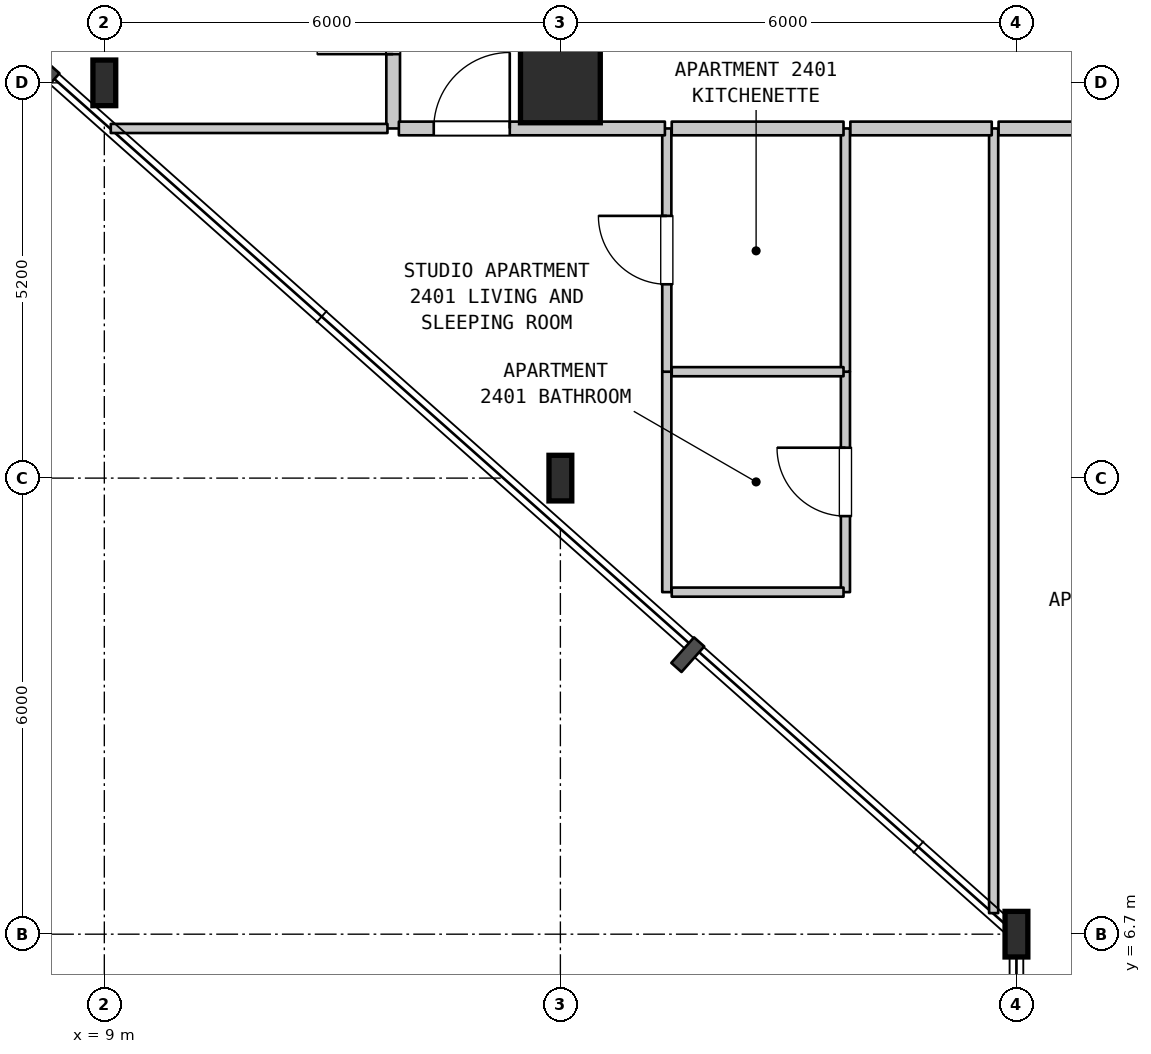
"""IFC4 building model, lengths in metres.
Left out: names, types, materials, properties, quantities, classifications, styles, units other than length and angle.
Written with IfcOpenShell. Run it as: python <this file> out.ifc"""

import sys

from ifc_helpers import new_model, si_unit, direction, frame, frame_2d, origin, origin_2d, place, context, subcontext, project, spatial, rectangle, i_section, extrude, element, fill, save


model = new_model("IFC4")
c1 = context("Model", 3, precision=1e-05, world=origin(), true_north=direction((0.0, 1.0)))
c2 = subcontext(c1, "Body", "Model", "MODEL_VIEW")
j1 = project(units=[si_unit("LENGTHUNIT", "METRE"), si_unit("PLANEANGLEUNIT", "RADIAN")], contexts=[c1])
p1 = place(None, origin())
s1 = spatial("IfcSite", under=j1, at=p1, CompositionType="ELEMENT")
p2 = place(p1, origin())
s2 = spatial("IfcBuilding", under=s1, at=p2, CompositionType="ELEMENT")
p3 = place(p2, frame((0.0, 0.0, 102.0)))
s3 = spatial("IfcBuildingStorey", under=s2, at=p3, CompositionType="ELEMENT", Elevation=102.0)
for number, where, z_axis, x_axis in (
    (1, (9.0, 17.9, 0.0), (0.0, 0.0, 1.0), (1.0, 0.0, 0.0)),
    (2, (15.0, 12.7, 0.0), (0.0, 0.0, 1.0), (1.0, 0.0, 0.0)),
):
    element("IfcColumn", number, at=place(p3, frame(where, z_axis=z_axis, x_axis=x_axis)), inside=s3, PredefinedType="COLUMN", context=c2, shape_type="SweptSolid", body=[
        extrude(i_section(OverallWidth=0.3, OverallDepth=0.6, WebThickness=0.015, FlangeThickness=0.03, FilletRadius=0.027, at=origin_2d()), origin(), (0.0, 0.0, 1.0), 3.7),
    ])
p4 = place(p3, frame((15.0, 17.9, 0.0), z_axis=(0.0, 0.0, 1.0), x_axis=(1.0, 0.0, 0.0)))
e3 = element("IfcColumn", 3, at=p4, inside=s3, PredefinedType="COLUMN", context=c2, shape_type="SweptSolid", body=[
    extrude(rectangle(XDim=1.05, YDim=1.05, at=origin_2d()), origin(), (0.0, 0.0, 1.0), 3.7),
])
p5 = place(p3, frame((21.0, 6.7, 0.0), z_axis=(0.0, 0.0, 1.0), x_axis=(1.0, 0.0, 0.0)))
e4 = element("IfcColumn", 4, at=p5, inside=s3, PredefinedType="COLUMN", context=c2, shape_type="SweptSolid", body=[
    extrude(i_section(OverallWidth=0.3, OverallDepth=0.6, WebThickness=0.015, FlangeThickness=0.03, FilletRadius=0.027, at=origin_2d()), origin(), (0.0, 0.0, 1.0), 3.7),
])
p6 = place(p3, frame((12.8, 17.3, 0.0), z_axis=(0.0, 0.0, 1.0), x_axis=(0.0, 1.0, 0.0)))
e5 = element("IfcWall", 5, at=p6, inside=s3, PredefinedType="STANDARD", context=c2, shape_type="SweptSolid", body=[
    extrude(rectangle(XDim=3.1, YDim=0.18, at=frame_2d((1.55, 0.0))), origin(), (0.0, 0.0, 1.0), 3.385),
])
p7 = place(p6, frame((0.978, 0.0, 0.0)))
e6 = element("IfcOpeningElement", 6, at=p7, cuts=e5, PredefinedType="OPENING", context=c2, shape_type="SweptSolid", body=[
    extrude(rectangle(XDim=1.0, YDim=2.15, at=frame_2d((0.5, 1.075))), frame((0.0, 0.1, 0.0), z_axis=(0.0, -1.0, 0.0), x_axis=(1.0, 0.0, 0.0)), (0.0, 0.0, 1.0), 0.2),
])
p8 = place(p3, frame((16.4, 11.2, 0.0), z_axis=(0.0, 0.0, 1.0), x_axis=(0.0, 1.0, 0.0)))
e7 = element("IfcWall", 7, at=p8, inside=s3, PredefinedType="PARTITIONING", context=c2, shape_type="SweptSolid", body=[
    extrude(rectangle(XDim=2.9, YDim=0.12, at=frame_2d((1.45, 0.0))), origin(), (0.0, 0.0, 1.0), 3.385),
])
p9 = place(p3, frame((16.4, 14.1, 0.0), z_axis=(0.0, 0.0, 1.0), x_axis=(0.0, 1.0, 0.0)))
e8 = element("IfcWall", 8, at=p9, inside=s3, PredefinedType="PARTITIONING", context=c2, shape_type="SweptSolid", body=[
    extrude(rectangle(XDim=3.2, YDim=0.12, at=frame_2d((1.6, 0.0))), origin(), (0.0, 0.0, 1.0), 3.385),
])
p10 = place(p9, frame((1.15, 0.0, 0.0)))
e9 = element("IfcOpeningElement", 9, at=p10, cuts=e8, PredefinedType="OPENING", context=c2, shape_type="SweptSolid", body=[
    extrude(rectangle(XDim=0.9, YDim=2.15, at=frame_2d((0.45, 1.075))), frame((0.0, 0.07, 0.0), z_axis=(0.0, -1.0, 0.0), x_axis=(1.0, 0.0, 0.0)), (0.0, 0.0, 1.0), 0.14),
])
p11 = place(p3, frame((18.75, 11.2, 0.0), z_axis=(0.0, 0.0, 1.0), x_axis=(0.0, 1.0, 0.0)))
e10 = element("IfcWall", 10, at=p11, inside=s3, PredefinedType="PARTITIONING", context=c2, shape_type="SweptSolid", body=[
    extrude(rectangle(XDim=2.9, YDim=0.12, at=frame_2d((1.45, 0.0))), origin(), (0.0, 0.0, 1.0), 3.385),
])
p12 = place(p11, frame((1.0, 0.0, 0.0)))
e11 = element("IfcOpeningElement", 11, at=p12, cuts=e10, PredefinedType="OPENING", context=c2, shape_type="SweptSolid", body=[
    extrude(rectangle(XDim=0.9, YDim=2.1, at=frame_2d((0.45, 1.05))), frame((0.0, 0.07, 0.0), z_axis=(0.0, -1.0, 0.0), x_axis=(1.0, 0.0, 0.0)), (0.0, 0.0, 1.0), 0.14),
])
p13 = place(p3, frame((18.75, 14.1, 0.0), z_axis=(0.0, 0.0, 1.0), x_axis=(0.0, 1.0, 0.0)))
e12 = element("IfcWall", 12, at=p13, inside=s3, PredefinedType="PARTITIONING", context=c2, shape_type="SweptSolid", body=[
    extrude(rectangle(XDim=3.2, YDim=0.12, at=frame_2d((1.6, 0.0))), origin(), (0.0, 0.0, 1.0), 3.385),
])
p14 = place(p3, frame((20.7, 6.977, 0.0), z_axis=(0.0, 0.0, 1.0), x_axis=(0.0, 1.0, 0.0)))
e13 = element("IfcWall", 13, at=p14, inside=s3, PredefinedType="PARTITIONING", context=c2, shape_type="SweptSolid", body=[
    extrude(rectangle(XDim=10.323, YDim=0.12, at=frame_2d((5.162, 0.0))), origin(), (0.0, 0.0, 1.0), 3.385),
])
for number, where, z_axis, x_axis in (
    (14, (16.465, 11.2, 0.0), (0.0, 0.0, 1.0), (1.0, 0.0, 0.0)),
    (15, (16.465, 14.1, 0.0), (0.0, 0.0, 1.0), (1.0, 0.0, 0.0)),
):
    element("IfcWall", number, at=place(p3, frame(where, z_axis=z_axis, x_axis=x_axis)), inside=s3, PredefinedType="PARTITIONING", context=c2, shape_type="SweptSolid", body=[
        extrude(rectangle(XDim=2.26, YDim=0.12, at=frame_2d((1.13, 0.0))), origin(), (0.0, 0.0, 1.0), 3.385),
    ])
p15 = place(p3, frame((9.085, 17.3, 0.0), z_axis=(0.0, 0.0, 1.0), x_axis=(1.0, 0.0, 0.0)))
e16 = element("IfcWall", 16, at=p15, inside=s3, PredefinedType="PARTITIONING", context=c2, shape_type="SweptSolid", body=[
    extrude(rectangle(XDim=3.64, YDim=0.12, at=frame_2d((1.82, 0.0))), origin(), (0.0, 0.0, 1.0), 3.385),
])
p16 = place(p3, frame((12.875, 17.3, 0.0), z_axis=(0.0, 0.0, 1.0), x_axis=(1.0, 0.0, 0.0)))
e17 = element("IfcWall", 17, at=p16, inside=s3, PredefinedType="STANDARD", context=c2, shape_type="SweptSolid", body=[
    extrude(rectangle(XDim=3.5, YDim=0.18, at=frame_2d((1.75, 0.0))), origin(), (0.0, 0.0, 1.0), 3.385),
])
p17 = place(p16, frame((0.459, 0.0, 0.0)))
e18 = element("IfcOpeningElement", 18, at=p17, cuts=e17, PredefinedType="OPENING", context=c2, shape_type="SweptSolid", body=[
    extrude(rectangle(XDim=1.0, YDim=2.15, at=frame_2d((0.5, 1.075))), frame((0.0, 0.1, 0.0), z_axis=(0.0, -1.0, 0.0), x_axis=(1.0, 0.0, 0.0)), (0.0, 0.0, 1.0), 0.2),
])
p18 = place(p3, frame((16.465, 17.3, 0.0), z_axis=(0.0, 0.0, 1.0), x_axis=(1.0, 0.0, 0.0)))
e19 = element("IfcWall", 19, at=p18, inside=s3, PredefinedType="STANDARD", context=c2, shape_type="SweptSolid", body=[
    extrude(rectangle(XDim=2.26, YDim=0.18, at=frame_2d((1.13, 0.0))), origin(), (0.0, 0.0, 1.0), 3.385),
])
p19 = place(p3, frame((18.815, 17.3, 0.0), z_axis=(0.0, 0.0, 1.0), x_axis=(1.0, 0.0, 0.0)))
e20 = element("IfcWall", 20, at=p19, inside=s3, PredefinedType="STANDARD", context=c2, shape_type="SweptSolid", body=[
    extrude(rectangle(XDim=1.86, YDim=0.18, at=frame_2d((0.93, 0.0))), origin(), (0.0, 0.0, 1.0), 3.385),
])
p20 = place(p3, frame((20.765, 17.3, 0.0), z_axis=(0.0, 0.0, 1.0), x_axis=(1.0, 0.0, 0.0)))
e21 = element("IfcWall", 21, at=p20, inside=s3, PredefinedType="STANDARD", context=c2, shape_type="SweptSolid", body=[
    extrude(rectangle(XDim=4.52, YDim=0.18, at=frame_2d((2.26, 0.0))), origin(), (0.0, 0.0, 1.0), 3.385),
])
p21 = place(p20, frame((1.76, 0.0, 0.0)))
e22 = element("IfcOpeningElement", 22, at=p21, cuts=e21, PredefinedType="OPENING", context=c2, shape_type="SweptSolid", body=[
    extrude(rectangle(XDim=1.0, YDim=2.15, at=frame_2d((0.5, 1.075))), frame((0.0, 0.1, 0.0), z_axis=(0.0, -1.0, 0.0), x_axis=(1.0, 0.0, 0.0)), (0.0, 0.0, 1.0), 0.2),
])
p22 = place(p7, origin())
e23 = element("IfcDoor", 23, at=p22, inside=s3, OperationType="SINGLE_SWING_LEFT", PredefinedType="DOOR", context=c2, shape_type="SweptSolid", body=[
    extrude(rectangle(XDim=1.0, YDim=2.15, at=frame_2d((0.5, 1.075))), frame((0.0, 0.025, 0.0), z_axis=(0.0, -1.0, 0.0), x_axis=(1.0, 0.0, 0.0)), (0.0, 0.0, 1.0), 0.05),
])
fill(e6, e23)
p23 = place(p10, origin())
e24 = element("IfcDoor", 24, at=p23, inside=s3, OperationType="SINGLE_SWING_RIGHT", PredefinedType="DOOR", context=c2, shape_type="SweptSolid", body=[
    extrude(rectangle(XDim=0.9, YDim=2.15, at=frame_2d((0.45, 1.075))), frame((0.0, 0.025, 0.0), z_axis=(0.0, -1.0, 0.0), x_axis=(1.0, 0.0, 0.0)), (0.0, 0.0, 1.0), 0.05),
])
fill(e9, e24)
p24 = place(p12, origin())
e25 = element("IfcDoor", 25, at=p24, inside=s3, OperationType="SINGLE_SWING_RIGHT", PredefinedType="DOOR", context=c2, shape_type="SweptSolid", body=[
    extrude(rectangle(XDim=0.9, YDim=2.1, at=frame_2d((0.45, 1.05))), frame((0.0, 0.025, 0.0), z_axis=(0.0, -1.0, 0.0), x_axis=(1.0, 0.0, 0.0)), (0.0, 0.0, 1.0), 0.05),
])
fill(e11, e25)
p25 = place(p17, origin())
e26 = element("IfcDoor", 26, at=p25, inside=s3, OperationType="SINGLE_SWING_RIGHT", PredefinedType="DOOR", context=c2, shape_type="SweptSolid", body=[
    extrude(rectangle(XDim=1.0, YDim=2.15, at=frame_2d((0.5, 1.075))), frame((0.0, 0.025, 0.0), z_axis=(0.0, -1.0, 0.0), x_axis=(1.0, 0.0, 0.0)), (0.0, 0.0, 1.0), 0.05),
])
fill(e18, e26)
save(model, sys.argv[1])
